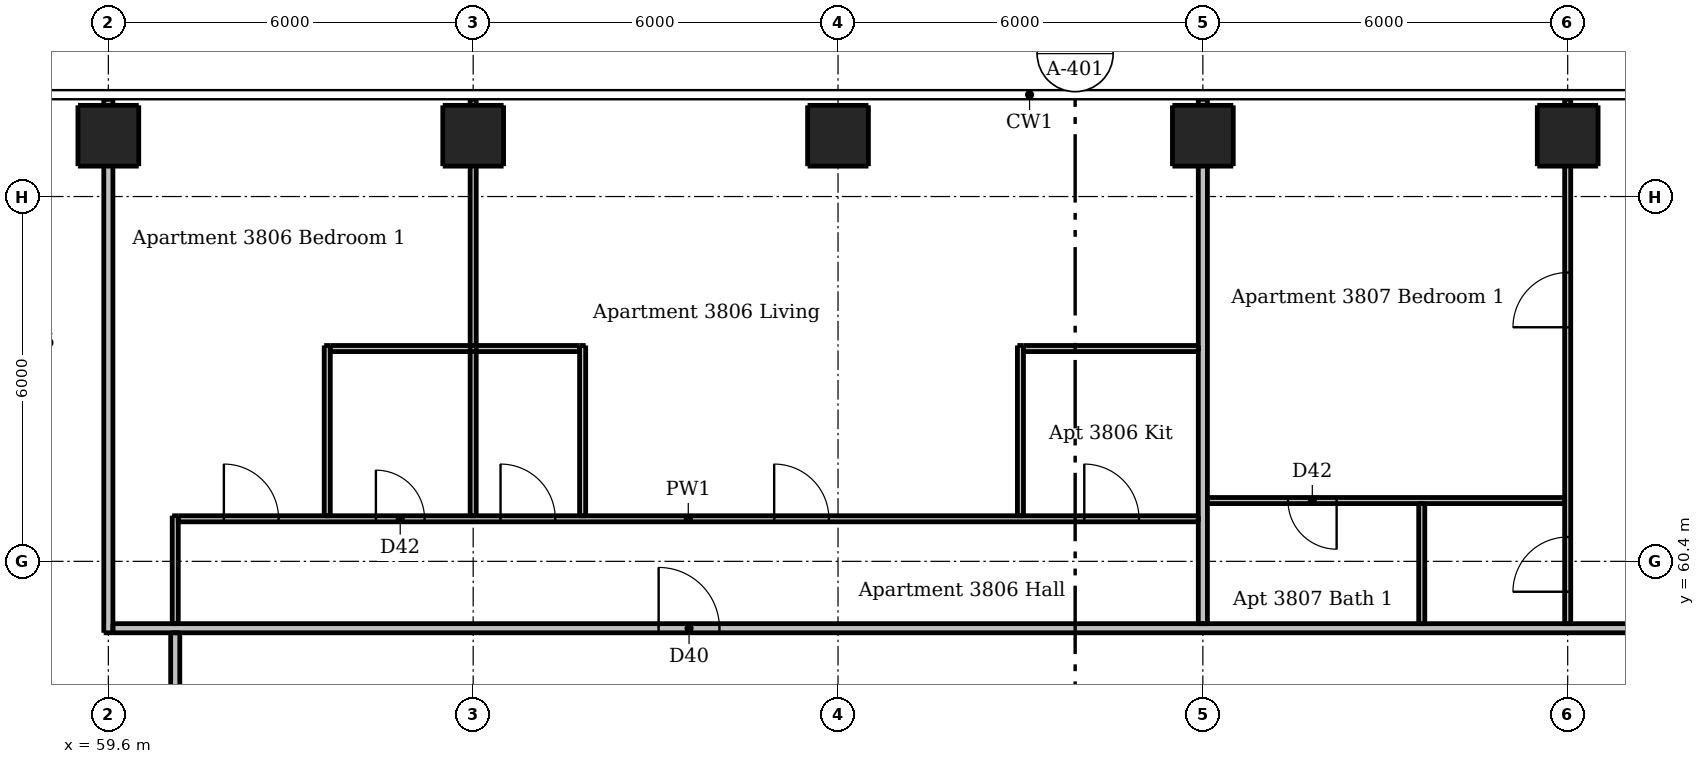
"""IFC4 building model, lengths in metres.
Left out: names, types, materials, properties, quantities, classifications, styles, units other than length and angle.
Written with IfcOpenShell. Run it as: python <this file> out.ifc"""

import sys

from ifc_helpers import new_model, si_unit, direction, frame, frame_2d, origin, origin_2d, place, context, subcontext, project, spatial, rectangle, extrude, element, fill, save


model = new_model("IFC4")
c1 = context("Model", 3, precision=1e-05, world=origin(), true_north=direction((0.0, 1.0)))
c2 = subcontext(c1, "Body", "Model", "MODEL_VIEW")
j1 = project(units=[si_unit("LENGTHUNIT", "METRE"), si_unit("PLANEANGLEUNIT", "RADIAN")], contexts=[c1])
p1 = place(None, origin())
s1 = spatial("IfcSite", under=j1, at=p1, CompositionType="ELEMENT")
p2 = place(p1, origin())
s2 = spatial("IfcBuilding", under=s1, at=p2, CompositionType="ELEMENT")
p3 = place(p2, frame((0.0, 0.0, 143.8)))
s3 = spatial("IfcBuildingStorey", under=s2, at=p3, CompositionType="ELEMENT", Elevation=143.8)
for number, where, z_axis, x_axis in (
    (1, (59.6, 67.4, 0.0), (0.0, 0.0, 1.0), (1.0, 0.0, 0.0)),
    (2, (65.6, 67.4, 0.0), (0.0, 0.0, 1.0), (1.0, 0.0, 0.0)),
    (3, (71.6, 67.4, 0.0), (0.0, 0.0, 1.0), (1.0, 0.0, 0.0)),
    (4, (77.6, 67.4, 0.0), (0.0, 0.0, 1.0), (1.0, 0.0, 0.0)),
    (5, (83.6, 67.4, 0.0), (0.0, 0.0, 1.0), (1.0, 0.0, 0.0)),
):
    element("IfcColumn", number, at=place(p3, frame(where, z_axis=z_axis, x_axis=x_axis)), inside=s3, PredefinedType="COLUMN", context=c2, shape_type="SweptSolid", body=[
        extrude(rectangle(XDim=1.0, YDim=1.0, at=origin_2d()), origin(), (0.0, 0.0, 1.0), 3.05),
    ])
p4 = place(p3, frame((60.7, 59.375, 0.0), z_axis=(0.0, 0.0, 1.0), x_axis=(0.0, 1.0, 0.0)))
e6 = element("IfcWall", 6, at=p4, inside=s3, PredefinedType="PARTITIONING", context=c2, shape_type="SweptSolid", body=[
    extrude(rectangle(XDim=1.775, YDim=0.1, at=frame_2d((0.887, 0.0))), origin(), (0.0, 0.0, 1.0), 3.05),
])
p5 = place(p3, frame((63.2, 61.15, 0.0), z_axis=(0.0, 0.0, 1.0), x_axis=(0.0, 1.0, 0.0)))
e7 = element("IfcWall", 7, at=p5, inside=s3, PredefinedType="PARTITIONING", context=c2, shape_type="SweptSolid", body=[
    extrude(rectangle(XDim=2.8, YDim=0.1, at=frame_2d((1.4, 0.0))), origin(), (0.0, 0.0, 1.0), 3.05),
])
p6 = place(p3, frame((65.6, 61.15, 0.0), z_axis=(0.0, 0.0, 1.0), x_axis=(0.0, 1.0, 0.0)))
e8 = element("IfcWall", 8, at=p6, inside=s3, PredefinedType="PARTITIONING", context=c2, shape_type="SweptSolid", body=[
    extrude(rectangle(XDim=6.85, YDim=0.1, at=frame_2d((3.425, 0.0))), origin(), (0.0, 0.0, 1.0), 2.516),
])
for number, where, z_axis, x_axis in (
    (9, (67.4, 61.15, 0.0), (0.0, 0.0, 1.0), (0.0, 1.0, 0.0)),
    (10, (74.6, 61.15, 0.0), (0.0, 0.0, 1.0), (0.0, 1.0, 0.0)),
):
    element("IfcWall", number, at=place(p3, frame(where, z_axis=z_axis, x_axis=x_axis)), inside=s3, PredefinedType="PARTITIONING", context=c2, shape_type="SweptSolid", body=[
        extrude(rectangle(XDim=2.8, YDim=0.1, at=frame_2d((1.4, 0.0))), origin(), (0.0, 0.0, 1.0), 3.05),
    ])
p7 = place(p3, frame((81.2, 59.375, 0.0), z_axis=(0.0, 0.0, 1.0), x_axis=(0.0, 1.0, 0.0)))
e11 = element("IfcWall", 11, at=p7, inside=s3, PredefinedType="PARTITIONING", context=c2, shape_type="SweptSolid", body=[
    extrude(rectangle(XDim=1.975, YDim=0.1, at=frame_2d((0.988, 0.0))), origin(), (0.0, 0.0, 1.0), 3.05),
])
p8 = place(p3, frame((83.6, 59.375, 0.0), z_axis=(0.0, 0.0, 1.0), x_axis=(0.0, 1.0, 0.0)))
e12 = element("IfcWall", 12, at=p8, inside=s3, PredefinedType="PARTITIONING", context=c2, shape_type="SweptSolid", body=[
    extrude(rectangle(XDim=8.625, YDim=0.1, at=frame_2d((4.312, 0.0))), origin(), (0.0, 0.0, 1.0), 2.516),
])
p9 = place(p8, frame((0.525, 0.0, 0.0)))
e13 = element("IfcOpeningElement", 13, at=p9, cuts=e12, PredefinedType="OPENING", context=c2, shape_type="SweptSolid", body=[
    extrude(rectangle(XDim=0.9, YDim=2.1, at=frame_2d((0.45, 1.05))), frame((0.0, 0.06, 0.0), z_axis=(0.0, -1.0, 0.0), x_axis=(1.0, 0.0, 0.0)), (0.0, 0.0, 1.0), 0.12),
])
p10 = place(p8, frame((4.875, 0.0, 0.0)))
e14 = element("IfcOpeningElement", 14, at=p10, cuts=e12, PredefinedType="OPENING", context=c2, shape_type="SweptSolid", body=[
    extrude(rectangle(XDim=0.9, YDim=2.1, at=frame_2d((0.45, 1.05))), frame((0.0, 0.06, 0.0), z_axis=(0.0, -1.0, 0.0), x_axis=(1.0, 0.0, 0.0)), (0.0, 0.0, 1.0), 0.12),
])
p11 = place(p3, frame((63.25, 63.9, 0.0), z_axis=(0.0, 0.0, 1.0), x_axis=(1.0, 0.0, 0.0)))
e15 = element("IfcWall", 15, at=p11, inside=s3, PredefinedType="PARTITIONING", context=c2, shape_type="SweptSolid", body=[
    extrude(rectangle(XDim=4.1, YDim=0.1, at=frame_2d((2.05, 0.0))), origin(), (0.0, 0.0, 1.0), 3.05),
])
p12 = place(p3, frame((74.65, 63.9, 0.0), z_axis=(0.0, 0.0, 1.0), x_axis=(1.0, 0.0, 0.0)))
e16 = element("IfcWall", 16, at=p12, inside=s3, PredefinedType="PARTITIONING", context=c2, shape_type="SweptSolid", body=[
    extrude(rectangle(XDim=2.875, YDim=0.1, at=frame_2d((1.438, 0.0))), origin(), (0.0, 0.0, 1.0), 3.05),
])
p13 = place(p3, frame((83.55, 61.4, 0.0), z_axis=(0.0, 0.0, 1.0), x_axis=(-1.0, 0.0, 0.0)))
e17 = element("IfcWall", 17, at=p13, inside=s3, PredefinedType="PARTITIONING", context=c2, shape_type="SweptSolid", body=[
    extrude(rectangle(XDim=5.875, YDim=0.1, at=frame_2d((2.938, 0.0))), origin(), (0.0, 0.0, 1.0), 3.05),
])
p14 = place(p13, frame((3.75, 0.0, 0.0)))
e18 = element("IfcOpeningElement", 18, at=p14, cuts=e17, PredefinedType="OPENING", context=c2, shape_type="SweptSolid", body=[
    extrude(rectangle(XDim=0.8, YDim=2.1, at=frame_2d((0.4, 1.05))), frame((0.0, 0.06, 0.0), z_axis=(0.0, -1.0, 0.0), x_axis=(1.0, 0.0, 0.0)), (0.0, 0.0, 1.0), 0.12),
])
p15 = place(p3, frame((60.75, 61.1, 0.0), z_axis=(0.0, 0.0, 1.0), x_axis=(1.0, 0.0, 0.0)))
e19 = element("IfcWall", 19, at=p15, inside=s3, PredefinedType="PARTITIONING", context=c2, shape_type="SweptSolid", body=[
    extrude(rectangle(XDim=16.775, YDim=0.1, at=frame_2d((8.387, 0.0))), origin(), (0.0, 0.0, 1.0), 3.05),
])
p16 = place(p15, frame((9.8, 0.0, 0.0)))
e20 = element("IfcOpeningElement", 20, at=p16, cuts=e19, PredefinedType="OPENING", context=c2, shape_type="SweptSolid", body=[
    extrude(rectangle(XDim=0.9, YDim=2.1, at=frame_2d((0.45, 1.05))), frame((0.0, 0.06, 0.0), z_axis=(0.0, -1.0, 0.0), x_axis=(1.0, 0.0, 0.0)), (0.0, 0.0, 1.0), 0.12),
])
p17 = place(p15, frame((14.9, 0.0, 0.0)))
e21 = element("IfcOpeningElement", 21, at=p17, cuts=e19, PredefinedType="OPENING", context=c2, shape_type="SweptSolid", body=[
    extrude(rectangle(XDim=0.9, YDim=2.1, at=frame_2d((0.45, 1.05))), frame((0.0, 0.06, 0.0), z_axis=(0.0, -1.0, 0.0), x_axis=(1.0, 0.0, 0.0)), (0.0, 0.0, 1.0), 0.12),
])
p18 = place(p15, frame((5.3, 0.0, 0.0)))
e22 = element("IfcOpeningElement", 22, at=p18, cuts=e19, PredefinedType="OPENING", context=c2, shape_type="SweptSolid", body=[
    extrude(rectangle(XDim=0.9, YDim=2.1, at=frame_2d((0.45, 1.05))), frame((0.0, 0.06, 0.0), z_axis=(0.0, -1.0, 0.0), x_axis=(1.0, 0.0, 0.0)), (0.0, 0.0, 1.0), 0.12),
])
p19 = place(p15, frame((0.75, 0.0, 0.0)))
e23 = element("IfcOpeningElement", 23, at=p19, cuts=e19, PredefinedType="OPENING", context=c2, shape_type="SweptSolid", body=[
    extrude(rectangle(XDim=0.9, YDim=2.1, at=frame_2d((0.45, 1.05))), frame((0.0, 0.06, 0.0), z_axis=(0.0, -1.0, 0.0), x_axis=(1.0, 0.0, 0.0)), (0.0, 0.0, 1.0), 0.12),
])
p20 = place(p15, frame((3.25, 0.0, 0.0)))
e24 = element("IfcOpeningElement", 24, at=p20, cuts=e19, PredefinedType="OPENING", context=c2, shape_type="SweptSolid", body=[
    extrude(rectangle(XDim=0.8, YDim=2.1, at=frame_2d((0.4, 1.05))), frame((0.0, 0.06, 0.0), z_axis=(0.0, -1.0, 0.0), x_axis=(1.0, 0.0, 0.0)), (0.0, 0.0, 1.0), 0.12),
])
p21 = place(p3, frame((59.6, 59.225, 0.0), z_axis=(0.0, 0.0, 1.0), x_axis=(0.0, 1.0, 0.0)))
e25 = element("IfcWall", 25, at=p21, inside=s3, PredefinedType="PARTITIONING", context=c2, shape_type="SweptSolid", body=[
    extrude(rectangle(XDim=8.775, YDim=0.15, at=frame_2d((4.387, 0.0))), origin(), (0.0, 0.0, 1.0), 2.51),
])
p22 = place(p3, frame((60.7, 30.325, 0.0), z_axis=(0.0, 0.0, 1.0), x_axis=(0.0, 1.0, 0.0)))
e26 = element("IfcWall", 26, at=p22, inside=s3, PredefinedType="PARTITIONING", context=c2, shape_type="SweptSolid", body=[
    extrude(rectangle(XDim=28.9, YDim=0.15, at=frame_2d((14.45, 0.0))), origin(), (0.0, 0.0, 1.0), 3.05),
])
p23 = place(p22, frame((9.225, 0.0, 0.0)))
e27 = element("IfcOpeningElement", 27, at=p23, cuts=e26, PredefinedType="OPENING", context=c2, shape_type="SweptSolid", body=[
    extrude(rectangle(XDim=1.0, YDim=2.1, at=frame_2d((0.5, 1.05))), frame((0.0, 0.085, 0.0), z_axis=(0.0, -1.0, 0.0), x_axis=(1.0, 0.0, 0.0)), (0.0, 0.0, 1.0), 0.17),
])
p24 = place(p22, frame((26.025, 0.0, 0.0)))
e28 = element("IfcOpeningElement", 28, at=p24, cuts=e26, PredefinedType="OPENING", context=c2, shape_type="SweptSolid", body=[
    extrude(rectangle(XDim=1.0, YDim=2.1, at=frame_2d((0.5, 1.05))), frame((0.0, 0.085, 0.0), z_axis=(0.0, -1.0, 0.0), x_axis=(1.0, 0.0, 0.0)), (0.0, 0.0, 1.0), 0.17),
])
p25 = place(p3, frame((77.6, 59.375, 0.0), z_axis=(0.0, 0.0, 1.0), x_axis=(0.0, 1.0, 0.0)))
e29 = element("IfcWall", 29, at=p25, inside=s3, PredefinedType="PARTITIONING", context=c2, shape_type="SweptSolid", body=[
    extrude(rectangle(XDim=8.625, YDim=0.15, at=frame_2d((4.312, 0.0))), origin(), (0.0, 0.0, 1.0), 2.516),
])
p26 = place(p3, frame((59.675, 59.3, 0.0), z_axis=(0.0, 0.0, 1.0), x_axis=(1.0, 0.0, 0.0)))
e30 = element("IfcWall", 30, at=p26, inside=s3, PredefinedType="PARTITIONING", context=c2, shape_type="SweptSolid", body=[
    extrude(rectangle(XDim=28.55, YDim=0.15, at=frame_2d((14.275, 0.0))), origin(), (0.0, 0.0, 1.0), 3.05),
])
p27 = place(p26, frame((8.975, 0.0, 0.0)))
e31 = element("IfcOpeningElement", 31, at=p27, cuts=e30, PredefinedType="OPENING", context=c2, shape_type="SweptSolid", body=[
    extrude(rectangle(XDim=1.0, YDim=2.1, at=frame_2d((0.5, 1.05))), frame((0.0, 0.085, 0.0), z_axis=(0.0, -1.0, 0.0), x_axis=(1.0, 0.0, 0.0)), (0.0, 0.0, 1.0), 0.17),
])
p28 = place(p26, frame((25.775, 0.0, 0.0)))
e32 = element("IfcOpeningElement", 32, at=p28, cuts=e30, PredefinedType="OPENING", context=c2, shape_type="SweptSolid", body=[
    extrude(rectangle(XDim=1.0, YDim=2.1, at=frame_2d((0.5, 1.05))), frame((0.0, 0.085, 0.0), z_axis=(0.0, -1.0, 0.0), x_axis=(1.0, 0.0, 0.0)), (0.0, 0.0, 1.0), 0.17),
])
p29 = place(p27, origin())
e33 = element("IfcDoor", 33, at=p29, inside=s3, OperationType="SINGLE_SWING_LEFT", PredefinedType="DOOR", context=c2, shape_type="SweptSolid", body=[
    extrude(rectangle(XDim=1.0, YDim=2.1, at=frame_2d((0.5, 1.05))), frame((0.0, 0.025, 0.0), z_axis=(0.0, -1.0, 0.0), x_axis=(1.0, 0.0, 0.0)), (0.0, 0.0, 1.0), 0.05),
])
fill(e31, e33)
p30 = place(p16, origin())
e34 = element("IfcDoor", 34, at=p30, inside=s3, OperationType="SINGLE_SWING_LEFT", PredefinedType="DOOR", context=c2, shape_type="SweptSolid", body=[
    extrude(rectangle(XDim=0.9, YDim=2.1, at=frame_2d((0.45, 1.05))), frame((0.0, 0.025, 0.0), z_axis=(0.0, -1.0, 0.0), x_axis=(1.0, 0.0, 0.0)), (0.0, 0.0, 1.0), 0.05),
])
fill(e20, e34)
p31 = place(p17, origin())
e35 = element("IfcDoor", 35, at=p31, inside=s3, OperationType="SINGLE_SWING_LEFT", PredefinedType="DOOR", context=c2, shape_type="SweptSolid", body=[
    extrude(rectangle(XDim=0.9, YDim=2.1, at=frame_2d((0.45, 1.05))), frame((0.0, 0.025, 0.0), z_axis=(0.0, -1.0, 0.0), x_axis=(1.0, 0.0, 0.0)), (0.0, 0.0, 1.0), 0.05),
])
fill(e21, e35)
p32 = place(p18, origin())
e36 = element("IfcDoor", 36, at=p32, inside=s3, OperationType="SINGLE_SWING_LEFT", PredefinedType="DOOR", context=c2, shape_type="SweptSolid", body=[
    extrude(rectangle(XDim=0.9, YDim=2.1, at=frame_2d((0.45, 1.05))), frame((0.0, 0.025, 0.0), z_axis=(0.0, -1.0, 0.0), x_axis=(1.0, 0.0, 0.0)), (0.0, 0.0, 1.0), 0.05),
])
fill(e22, e36)
p33 = place(p19, origin())
e37 = element("IfcDoor", 37, at=p33, inside=s3, OperationType="SINGLE_SWING_LEFT", PredefinedType="DOOR", context=c2, shape_type="SweptSolid", body=[
    extrude(rectangle(XDim=0.9, YDim=2.1, at=frame_2d((0.45, 1.05))), frame((0.0, 0.025, 0.0), z_axis=(0.0, -1.0, 0.0), x_axis=(1.0, 0.0, 0.0)), (0.0, 0.0, 1.0), 0.05),
])
fill(e23, e37)
p34 = place(p20, origin())
e38 = element("IfcDoor", 38, at=p34, inside=s3, OperationType="SINGLE_SWING_LEFT", PredefinedType="DOOR", context=c2, shape_type="SweptSolid", body=[
    extrude(rectangle(XDim=0.8, YDim=2.1, at=frame_2d((0.4, 1.05))), frame((0.0, 0.025, 0.0), z_axis=(0.0, -1.0, 0.0), x_axis=(1.0, 0.0, 0.0)), (0.0, 0.0, 1.0), 0.05),
])
fill(e24, e38)
p35 = place(p9, origin())
e39 = element("IfcDoor", 39, at=p35, inside=s3, OperationType="SINGLE_SWING_LEFT", PredefinedType="DOOR", context=c2, shape_type="SweptSolid", body=[
    extrude(rectangle(XDim=0.9, YDim=2.1, at=frame_2d((0.45, 1.05))), frame((0.0, 0.025, 0.0), z_axis=(0.0, -1.0, 0.0), x_axis=(1.0, 0.0, 0.0)), (0.0, 0.0, 1.0), 0.05),
])
fill(e13, e39)
p36 = place(p10, origin())
e40 = element("IfcDoor", 40, at=p36, inside=s3, OperationType="SINGLE_SWING_LEFT", PredefinedType="DOOR", context=c2, shape_type="SweptSolid", body=[
    extrude(rectangle(XDim=0.9, YDim=2.1, at=frame_2d((0.45, 1.05))), frame((0.0, 0.025, 0.0), z_axis=(0.0, -1.0, 0.0), x_axis=(1.0, 0.0, 0.0)), (0.0, 0.0, 1.0), 0.05),
])
fill(e14, e40)
p37 = place(p14, origin())
e41 = element("IfcDoor", 41, at=p37, inside=s3, OperationType="SINGLE_SWING_LEFT", PredefinedType="DOOR", context=c2, shape_type="SweptSolid", body=[
    extrude(rectangle(XDim=0.8, YDim=2.1, at=frame_2d((0.4, 1.05))), frame((0.0, 0.025, 0.0), z_axis=(0.0, -1.0, 0.0), x_axis=(1.0, 0.0, 0.0)), (0.0, 0.0, 1.0), 0.05),
])
fill(e18, e41)
save(model, sys.argv[1])
